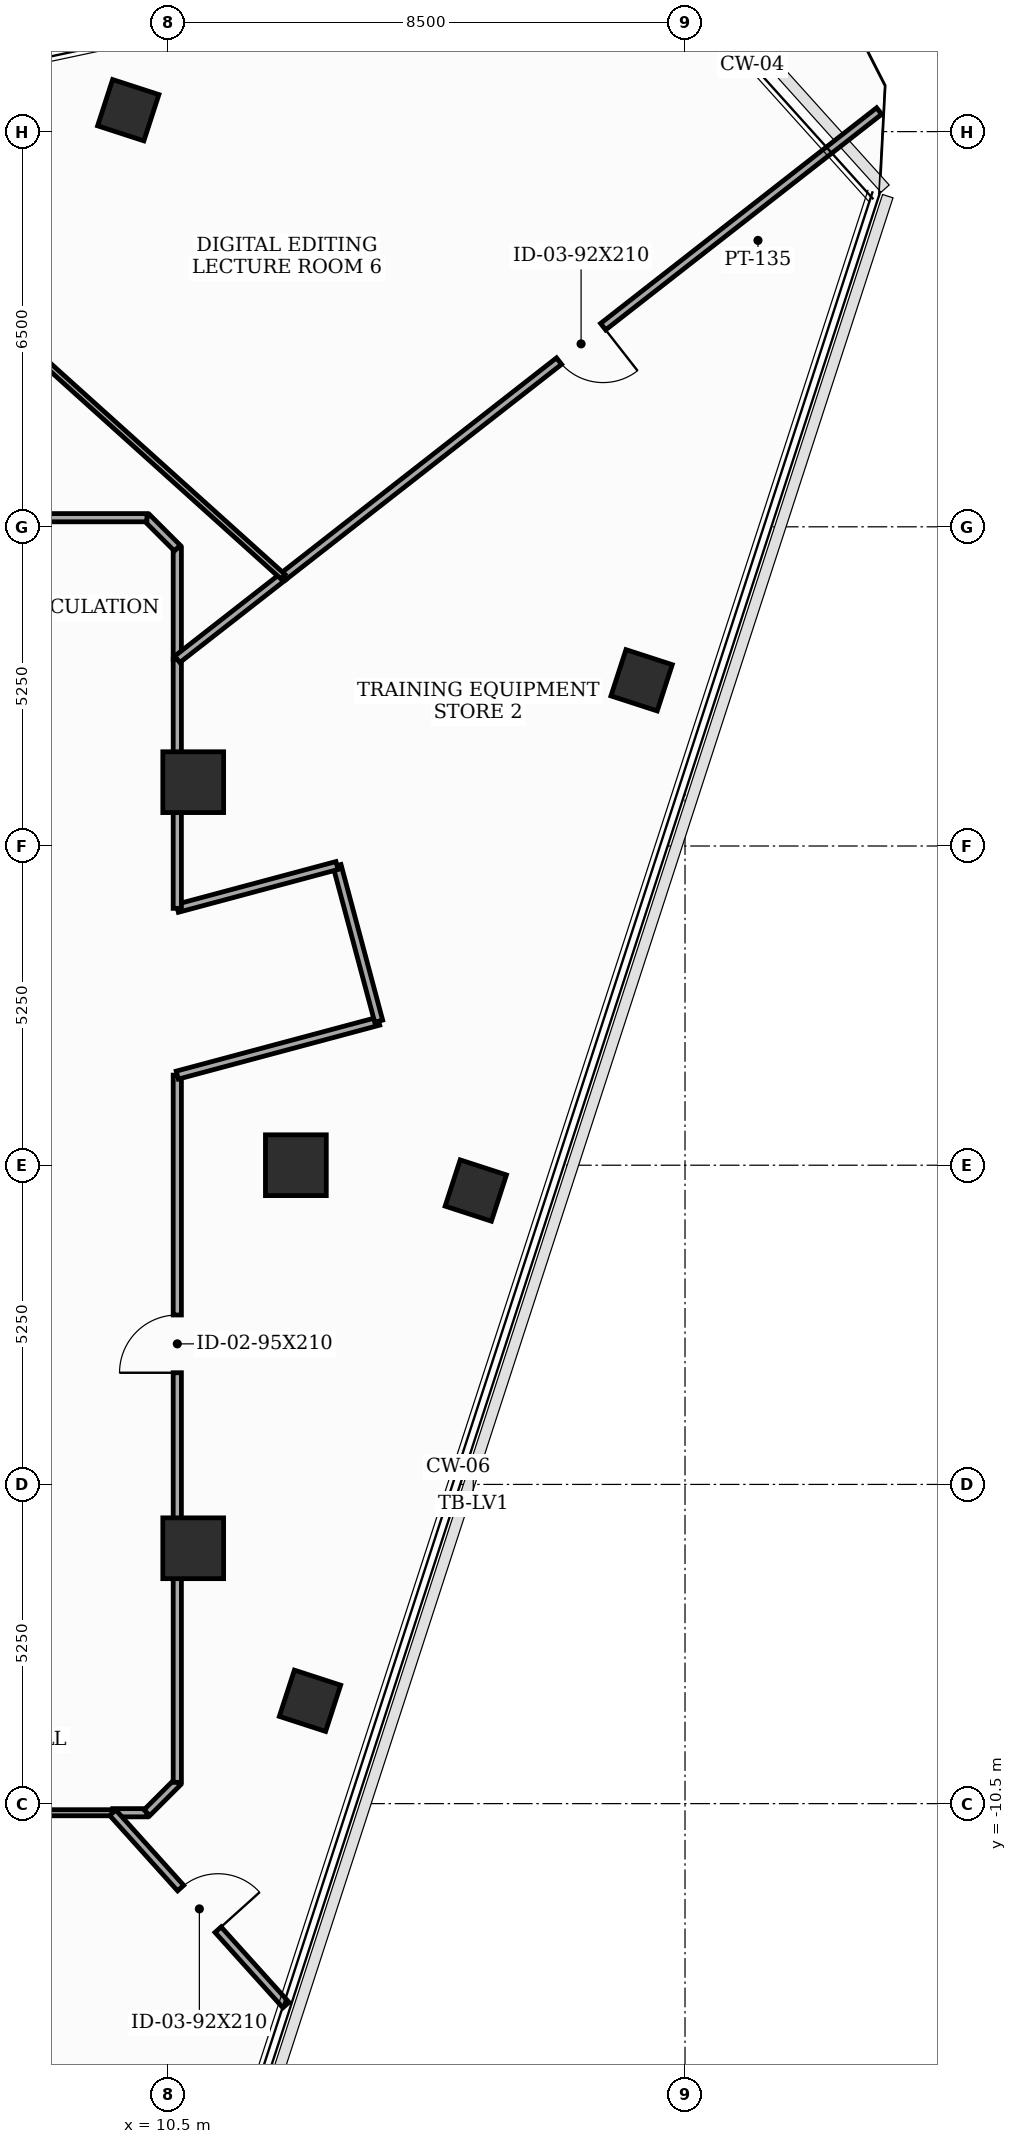
"""IFC4 building model, lengths in metres.
Left out: names, types, materials, properties, quantities, classifications, styles, units other than length and angle.
Written with IfcOpenShell. Run it as: python <this file> out.ifc"""

import sys

from ifc_helpers import new_model, si_unit, direction, frame, frame_2d, origin, origin_2d, place, context, subcontext, project, spatial, rectangle, extrude, element, fill, save


model = new_model("IFC4")
c1 = context("Model", 3, precision=1e-05, world=origin(), true_north=direction((0.0, 1.0)))
c2 = subcontext(c1, "Body", "Model", "MODEL_VIEW")
j1 = project(units=[si_unit("LENGTHUNIT", "METRE"), si_unit("PLANEANGLEUNIT", "RADIAN")], contexts=[c1])
p1 = place(None, origin())
s1 = spatial("IfcSite", under=j1, at=p1, CompositionType="ELEMENT")
p2 = place(p1, origin())
s2 = spatial("IfcBuilding", under=s1, at=p2, CompositionType="ELEMENT")
p3 = place(p2, frame((0.0, 0.0, 283.2)))
s3 = spatial("IfcBuildingStorey", under=s2, at=p3, CompositionType="ELEMENT", Elevation=283.2)
for number, where, z_axis, x_axis in (
    (1, (12.6, 0.0, 0.0), (0.0, 0.0, 1.0), (1.0, 0.0, 0.0)),
    (2, (10.912, 6.3, 0.0), (0.0, 0.0, 1.0), (1.0, 0.0, 0.0)),
    (3, (10.912, -6.3, 0.0), (0.0, 0.0, 1.0), (1.0, 0.0, 0.0)),
):
    element("IfcColumn", number, at=place(p3, frame(where, z_axis=z_axis, x_axis=x_axis)), inside=s3, PredefinedType="COLUMN", context=c2, shape_type="SweptSolid", body=[
        extrude(rectangle(XDim=1.0, YDim=1.0, at=origin_2d()), origin(), (0.0, 0.0, 1.0), 3.7),
    ])
for number, where, z_axis, x_axis in (
    (4, (12.833, -8.809, 0.0), (0.0, 0.0, 1.0), (0.309, 0.951, 0.0)),
    (5, (15.559, -0.417, 0.0), (0.0, 0.0, 1.0), (0.309, 0.951, 0.0)),
    (6, (18.286, 7.976, 0.0), (0.0, 0.0, 1.0), (0.309, 0.951, 0.0)),
    (7, (9.844, 17.352, 0.0), (0.0, 0.0, 1.0), (0.309, 0.951, 0.0)),
):
    element("IfcColumn", number, at=place(p3, frame(where, z_axis=z_axis, x_axis=x_axis)), inside=s3, PredefinedType="COLUMN", context=c2, shape_type="SweptSolid", body=[
        extrude(rectangle(XDim=0.8, YDim=0.8, at=origin_2d()), origin(), (0.0, 0.0, 1.0), 3.7),
    ])
p4 = place(p3, frame((9.589, -10.65, 0.0), z_axis=(0.0, 0.0, 1.0), x_axis=(1.0, 0.0, 0.0)))
e8 = element("IfcWall", 8, at=p4, inside=s3, PredefinedType="PARTITIONING", context=c2, shape_type="SweptSolid", body=[
    extrude(rectangle(XDim=0.561, YDim=0.135, at=frame_2d((0.28, 0.0))), origin(), (0.0, 0.0, 1.0), 3.5),
])
p5 = place(p3, frame((10.15, -10.65, 0.0), z_axis=(0.0, 0.0, 1.0), x_axis=(0.707106781187, 0.707106781187, 0.0)))
e9 = element("IfcWall", 9, at=p5, inside=s3, PredefinedType="PARTITIONING", context=c2, shape_type="SweptSolid", body=[
    extrude(rectangle(XDim=0.707, YDim=0.135, at=frame_2d((0.354, 0.0))), origin(), (0.0, 0.0, 1.0), 3.5),
])
p6 = place(p3, frame((10.65, -10.15, 0.0), z_axis=(0.0, 0.0, 1.0), x_axis=(0.0, 1.0, 0.0)))
e10 = element("IfcWall", 10, at=p6, inside=s3, PredefinedType="PARTITIONING", context=c2, shape_type="SweptSolid", body=[
    extrude(rectangle(XDim=11.632, YDim=0.135, at=frame_2d((5.816, 0.0))), origin(), (0.0, 0.0, 1.0), 2.885),
])
p7 = place(p6, frame((6.737, 0.0, 0.0)))
e11 = element("IfcOpeningElement", 11, at=p7, cuts=e10, PredefinedType="OPENING", context=c2, shape_type="SweptSolid", body=[
    extrude(rectangle(XDim=0.95, YDim=2.1, at=frame_2d((0.475, 1.05))), frame((0.0, 0.077, 0.0), z_axis=(0.0, -1.0, 0.0), x_axis=(1.0, 0.0, 0.0)), (0.0, 0.0, 1.0), 0.155),
])
p8 = place(p3, frame((10.65, 1.482, 0.0), z_axis=(0.0, 0.0, 1.0), x_axis=(0.965961397105, 0.2586862565, 0.0)))
e12 = element("IfcWall", 12, at=p8, inside=s3, PredefinedType="PARTITIONING", context=c2, shape_type="SweptSolid", body=[
    extrude(rectangle(XDim=3.429, YDim=0.135, at=frame_2d((1.714, 0.0))), origin(), (0.0, 0.0, 1.0), 2.885),
])
p9 = place(p3, frame((13.962, 2.369, 0.0), z_axis=(0.0, 0.0, 1.0), x_axis=(-0.258413725385, 0.966034340245, 0.0)))
e13 = element("IfcWall", 13, at=p9, inside=s3, PredefinedType="PARTITIONING", context=c2, shape_type="SweptSolid", body=[
    extrude(rectangle(XDim=2.65, YDim=0.135, at=frame_2d((1.325, 0.0))), origin(), (0.0, 0.0, 1.0), 3.5),
])
p10 = place(p3, frame((13.277, 4.929, 0.0), z_axis=(0.0, 0.0, 1.0), x_axis=(-0.965934830229, -0.258785439601, 0.0)))
e14 = element("IfcWall", 14, at=p10, inside=s3, PredefinedType="PARTITIONING", context=c2, shape_type="SweptSolid", body=[
    extrude(rectangle(XDim=2.72, YDim=0.135, at=frame_2d((1.36, 0.0))), origin(), (0.0, 0.0, 1.0), 2.885),
])
p11 = place(p3, frame((10.65, 4.225, 0.0), z_axis=(0.0, 0.0, 1.0), x_axis=(0.0, 1.0, 0.0)))
e15 = element("IfcWall", 15, at=p11, inside=s3, PredefinedType="PARTITIONING", context=c2, shape_type="SweptSolid", body=[
    extrude(rectangle(XDim=4.096, YDim=0.135, at=frame_2d((2.048, 0.0))), origin(), (0.0, 0.0, 1.0), 2.885),
])
p12 = place(p3, frame((2.45, -10.65, 0.0), z_axis=(0.0, 0.0, 1.0), x_axis=(1.0, 0.0, 0.0)))
e16 = element("IfcWall", 16, at=p12, inside=s3, PredefinedType="MOVABLE", context=c2, shape_type="SweptSolid", body=[
    extrude(rectangle(XDim=7.139, YDim=0.1, at=frame_2d((3.57, 0.0))), origin(), (0.0, 0.0, 1.0), 2.885),
])
p13 = place(p3, frame((10.65, 8.321, 0.0), z_axis=(0.0, 0.0, 1.0), x_axis=(0.0, 1.0, 0.0)))
e17 = element("IfcWall", 17, at=p13, inside=s3, PredefinedType="PARTITIONING", context=c2, shape_type="SweptSolid", body=[
    extrude(rectangle(XDim=1.829, YDim=0.135, at=frame_2d((0.915, 0.0))), origin(), (0.0, 0.0, 1.0), 3.5),
])
p14 = place(p3, frame((10.65, 10.15, 0.0), z_axis=(0.0, 0.0, 1.0), x_axis=(-0.707106781187, 0.707106781187, 0.0)))
e18 = element("IfcWall", 18, at=p14, inside=s3, PredefinedType="PARTITIONING", context=c2, shape_type="SweptSolid", body=[
    extrude(rectangle(XDim=0.707, YDim=0.135, at=frame_2d((0.354, 0.0))), origin(), (0.0, 0.0, 1.0), 3.5),
])
p15 = place(p3, frame((10.15, 10.65, 0.0), z_axis=(0.0, 0.0, 1.0), x_axis=(-1.0, 0.0, 0.0)))
e19 = element("IfcWall", 19, at=p15, inside=s3, PredefinedType="PARTITIONING", context=c2, shape_type="SweptSolid", body=[
    extrude(rectangle(XDim=11.3, YDim=0.135, at=frame_2d((5.65, 0.0))), origin(), (0.0, 0.0, 1.0), 2.885),
])
p16 = place(p15, frame((6.531, 0.0, 0.0)))
e20 = element("IfcOpeningElement", 20, at=p16, cuts=e19, PredefinedType="OPENING", context=c2, shape_type="SweptSolid", body=[
    extrude(rectangle(XDim=0.95, YDim=2.1, at=frame_2d((0.475, 1.05))), frame((0.0, 0.077, 0.0), z_axis=(0.0, -1.0, 0.0), x_axis=(1.0, 0.0, 0.0)), (0.0, 0.0, 1.0), 0.155),
])
p17 = place(p3, frame((9.589, -10.65, 0.0), z_axis=(0.0, 0.0, 1.0), x_axis=(0.66916439333, -0.743114402161, 0.0)))
e21 = element("IfcWall", 21, at=p17, inside=s3, PredefinedType="PARTITIONING", context=c2, shape_type="SweptSolid", body=[
    extrude(rectangle(XDim=4.256, YDim=0.135, at=frame_2d((2.128, 0.0))), origin(), (0.0, 0.0, 1.0), 3.035),
])
p18 = place(p17, frame((1.668, 0.0, 0.0)))
e22 = element("IfcOpeningElement", 22, at=p18, cuts=e21, PredefinedType="OPENING", context=c2, shape_type="SweptSolid", body=[
    extrude(rectangle(XDim=0.92, YDim=2.1, at=frame_2d((0.46, 1.05))), frame((0.0, 0.077, 0.0), z_axis=(0.0, -1.0, 0.0), x_axis=(1.0, 0.0, 0.0)), (0.0, 0.0, 1.0), 0.155),
])
p19 = place(p3, frame((22.192, 17.338, 0.0), z_axis=(0.0, 0.0, 1.0), x_axis=(-0.788006224946, -0.615667271703, 0.0)))
e23 = element("IfcWall", 23, at=p19, inside=s3, PredefinedType="PARTITIONING", context=c2, shape_type="SweptSolid", body=[
    extrude(rectangle(XDim=12.441, YDim=0.135, at=frame_2d((6.22, 0.0))), origin(), (0.0, 0.0, 1.0), 3.035),
])
p20 = place(p19, frame((5.76, 0.0, 0.0)))
e24 = element("IfcOpeningElement", 24, at=p20, cuts=e23, PredefinedType="OPENING", context=c2, shape_type="SweptSolid", body=[
    extrude(rectangle(XDim=0.92, YDim=2.1, at=frame_2d((0.46, 1.05))), frame((0.0, 0.077, 0.0), z_axis=(0.0, -1.0, 0.0), x_axis=(1.0, 0.0, 0.0)), (0.0, 0.0, 1.0), 0.155),
])
p21 = place(p3, frame((12.389, 9.679, 0.0), z_axis=(0.0, 0.0, 1.0), x_axis=(-0.788177008199, -0.615448619908, 0.0)))
e25 = element("IfcWall", 25, at=p21, inside=s3, PredefinedType="PARTITIONING", context=c2, shape_type="SweptSolid", body=[
    extrude(rectangle(XDim=2.206, YDim=0.135, at=frame_2d((1.103, 0.0))), origin(), (0.0, 0.0, 1.0), 3.5),
])
p22 = place(p3, frame((8.019, 13.614, 0.0), z_axis=(0.0, 0.0, 1.0), x_axis=(0.743110388877, -0.669168850099, 0.0)))
e26 = element("IfcWall", 26, at=p22, inside=s3, PredefinedType="MOVABLE", context=c2, shape_type="SweptSolid", body=[
    extrude(rectangle(XDim=5.881, YDim=0.1, at=frame_2d((2.94, 0.0))), origin(), (0.0, 0.0, 1.0), 3.035),
])
p23 = place(p7, origin())
e27 = element("IfcDoor", 27, at=p23, inside=s3, OperationType="SINGLE_SWING_LEFT", PredefinedType="DOOR", context=c2, shape_type="SweptSolid", body=[
    extrude(rectangle(XDim=0.95, YDim=2.1, at=frame_2d((0.475, 1.05))), frame((0.0, 0.025, 0.0), z_axis=(0.0, -1.0, 0.0), x_axis=(1.0, 0.0, 0.0)), (0.0, 0.0, 1.0), 0.05),
])
fill(e11, e27)
p24 = place(p18, origin())
e28 = element("IfcDoor", 28, at=p24, inside=s3, OperationType="SINGLE_SWING_RIGHT", PredefinedType="DOOR", context=c2, shape_type="SweptSolid", body=[
    extrude(rectangle(XDim=0.92, YDim=2.1, at=frame_2d((0.46, 1.05))), frame((0.0, 0.025, 0.0), z_axis=(0.0, -1.0, 0.0), x_axis=(1.0, 0.0, 0.0)), (0.0, 0.0, 1.0), 0.05),
])
fill(e22, e28)
p25 = place(p20, origin())
e29 = element("IfcDoor", 29, at=p25, inside=s3, OperationType="SINGLE_SWING_LEFT", PredefinedType="DOOR", context=c2, shape_type="SweptSolid", body=[
    extrude(rectangle(XDim=0.92, YDim=2.1, at=frame_2d((0.46, 1.05))), frame((0.0, 0.025, 0.0), z_axis=(0.0, -1.0, 0.0), x_axis=(1.0, 0.0, 0.0)), (0.0, 0.0, 1.0), 0.05),
])
fill(e24, e29)
save(model, sys.argv[1])
